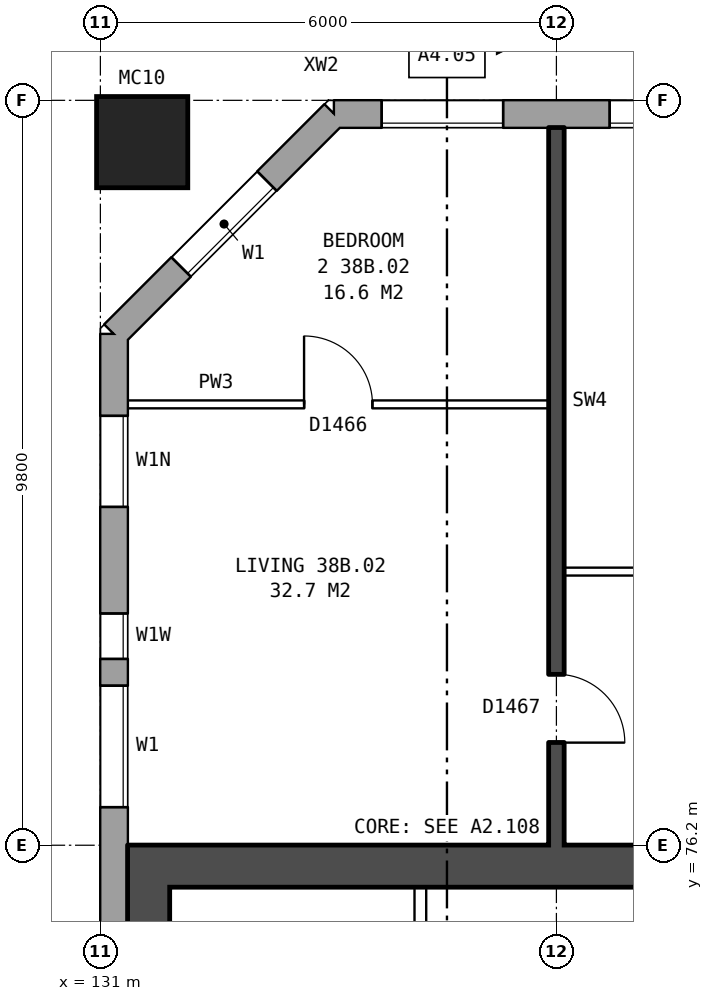
"""IFC4 building model, lengths in metres.
Left out: names, types, materials, properties, quantities, classifications, styles, units other than length and angle.
Written with IfcOpenShell. Run it as: python <this file> out.ifc"""

import sys

from ifc_helpers import new_model, si_unit, direction, frame, frame_2d, origin, origin_2d, place, context, subcontext, project, spatial, rectangle, hollow_rectangle, extrude, element, fill, save


model = new_model("IFC4")
c1 = context("Model", 3, precision=1e-05, world=origin(), true_north=direction((0.0, 1.0)))
c2 = subcontext(c1, "Body", "Model", "MODEL_VIEW")
j1 = project(units=[si_unit("LENGTHUNIT", "METRE"), si_unit("PLANEANGLEUNIT", "RADIAN")], contexts=[c1])
p1 = place(None, origin())
s1 = spatial("IfcSite", under=j1, at=p1, CompositionType="ELEMENT")
p2 = place(p1, origin())
s2 = spatial("IfcBuilding", under=s1, at=p2, CompositionType="ELEMENT")
p3 = place(p2, frame((0.0, 0.0, 136.1)))
s3 = spatial("IfcBuildingStorey", under=s2, at=p3, CompositionType="ELEMENT", Elevation=136.1)
p4 = place(p3, frame((131.55, 85.45, 0.0), z_axis=(0.0, 0.0, 1.0), x_axis=(1.0, 0.0, 0.0)))
e1 = element("IfcColumn", 1, at=p4, inside=s3, PredefinedType="COLUMN", context=c2, shape_type="SweptSolid", body=[
    extrude(hollow_rectangle(XDim=1.2, YDim=1.2, WallThickness=0.065, at=origin_2d()), origin(), (0.0, 0.0, 1.0), 3.1),
])
p5 = place(p3, frame((169.675, 85.82, 0.0), z_axis=(0.0, 0.0, 1.0), x_axis=(-1.0, 0.0, 0.0)))
e2 = element("IfcWall", 2, at=p5, inside=s3, PredefinedType="STANDARD", context=c2, shape_type="SweptSolid", body=[
    extrude(rectangle(XDim=35.601, YDim=0.36, at=frame_2d((17.8, 0.0))), origin(), (0.0, 0.0, 1.0), 2.85),
])
p6 = place(p5, frame((0.375, 0.0, 0.8)))
e3 = element("IfcOpeningElement", 3, at=p6, cuts=e2, PredefinedType="OPENING", context=c2, shape_type="SweptSolid", body=[
    extrude(rectangle(XDim=1.6, YDim=1.8, at=frame_2d((0.8, 0.9))), frame((0.0, 0.19, 0.0), z_axis=(0.0, -1.0, 0.0), x_axis=(1.0, 0.0, 0.0)), (0.0, 0.0, 1.0), 0.38),
])
p7 = place(p5, frame((3.375, 0.0, 0.8)))
e4 = element("IfcOpeningElement", 4, at=p7, cuts=e2, PredefinedType="OPENING", context=c2, shape_type="SweptSolid", body=[
    extrude(rectangle(XDim=1.6, YDim=1.8, at=frame_2d((0.8, 0.9))), frame((0.0, 0.19, 0.0), z_axis=(0.0, -1.0, 0.0), x_axis=(1.0, 0.0, 0.0)), (0.0, 0.0, 1.0), 0.38),
])
p8 = place(p5, frame((6.375, 0.0, 0.8)))
e5 = element("IfcOpeningElement", 5, at=p8, cuts=e2, PredefinedType="OPENING", context=c2, shape_type="SweptSolid", body=[
    extrude(rectangle(XDim=1.6, YDim=1.8, at=frame_2d((0.8, 0.9))), frame((0.0, 0.19, 0.0), z_axis=(0.0, -1.0, 0.0), x_axis=(1.0, 0.0, 0.0)), (0.0, 0.0, 1.0), 0.38),
])
p9 = place(p5, frame((9.375, 0.0, 0.8)))
e6 = element("IfcOpeningElement", 6, at=p9, cuts=e2, PredefinedType="OPENING", context=c2, shape_type="SweptSolid", body=[
    extrude(rectangle(XDim=1.6, YDim=1.8, at=frame_2d((0.8, 0.9))), frame((0.0, 0.19, 0.0), z_axis=(0.0, -1.0, 0.0), x_axis=(1.0, 0.0, 0.0)), (0.0, 0.0, 1.0), 0.38),
])
p10 = place(p5, frame((11.275, 0.0, 0.8)))
e7 = element("IfcOpeningElement", 7, at=p10, cuts=e2, PredefinedType="OPENING", context=c2, shape_type="SweptSolid", body=[
    extrude(rectangle(XDim=1.2, YDim=1.8, at=frame_2d((0.6, 0.9))), frame((0.0, 0.19, 0.0), z_axis=(0.0, -1.0, 0.0), x_axis=(1.0, 0.0, 0.0)), (0.0, 0.0, 1.0), 0.38),
])
p11 = place(p5, frame((15.375, 0.0, 0.8)))
e8 = element("IfcOpeningElement", 8, at=p11, cuts=e2, PredefinedType="OPENING", context=c2, shape_type="SweptSolid", body=[
    extrude(rectangle(XDim=1.6, YDim=1.8, at=frame_2d((0.8, 0.9))), frame((0.0, 0.19, 0.0), z_axis=(0.0, -1.0, 0.0), x_axis=(1.0, 0.0, 0.0)), (0.0, 0.0, 1.0), 0.38),
])
p12 = place(p5, frame((18.375, 0.0, 0.8)))
e9 = element("IfcOpeningElement", 9, at=p12, cuts=e2, PredefinedType="OPENING", context=c2, shape_type="SweptSolid", body=[
    extrude(rectangle(XDim=1.6, YDim=1.8, at=frame_2d((0.8, 0.9))), frame((0.0, 0.19, 0.0), z_axis=(0.0, -1.0, 0.0), x_axis=(1.0, 0.0, 0.0)), (0.0, 0.0, 1.0), 0.38),
])
p13 = place(p5, frame((20.875, 0.0, 0.35)))
e10 = element("IfcOpeningElement", 10, at=p13, cuts=e2, PredefinedType="OPENING", context=c2, shape_type="SweptSolid", body=[
    extrude(rectangle(XDim=0.6, YDim=0.9, at=frame_2d((0.3, 0.45))), frame((0.0, 0.19, 0.0), z_axis=(0.0, -1.0, 0.0), x_axis=(1.0, 0.0, 0.0)), (0.0, 0.0, 1.0), 0.38),
])
p14 = place(p5, frame((24.375, 0.0, 0.8)))
e11 = element("IfcOpeningElement", 11, at=p14, cuts=e2, PredefinedType="OPENING", context=c2, shape_type="SweptSolid", body=[
    extrude(rectangle(XDim=1.6, YDim=1.8, at=frame_2d((0.8, 0.9))), frame((0.0, 0.19, 0.0), z_axis=(0.0, -1.0, 0.0), x_axis=(1.0, 0.0, 0.0)), (0.0, 0.0, 1.0), 0.38),
])
p15 = place(p5, frame((27.375, 0.0, 0.8)))
e12 = element("IfcOpeningElement", 12, at=p15, cuts=e2, PredefinedType="OPENING", context=c2, shape_type="SweptSolid", body=[
    extrude(rectangle(XDim=1.6, YDim=1.8, at=frame_2d((0.8, 0.9))), frame((0.0, 0.19, 0.0), z_axis=(0.0, -1.0, 0.0), x_axis=(1.0, 0.0, 0.0)), (0.0, 0.0, 1.0), 0.38),
])
p16 = place(p5, frame((30.375, 0.0, 0.8)))
e13 = element("IfcOpeningElement", 13, at=p16, cuts=e2, PredefinedType="OPENING", context=c2, shape_type="SweptSolid", body=[
    extrude(rectangle(XDim=1.6, YDim=1.8, at=frame_2d((0.8, 0.9))), frame((0.0, 0.19, 0.0), z_axis=(0.0, -1.0, 0.0), x_axis=(1.0, 0.0, 0.0)), (0.0, 0.0, 1.0), 0.38),
])
p17 = place(p5, frame((33.375, 0.0, 0.8)))
e14 = element("IfcOpeningElement", 14, at=p17, cuts=e2, PredefinedType="OPENING", context=c2, shape_type="SweptSolid", body=[
    extrude(rectangle(XDim=1.6, YDim=1.8, at=frame_2d((0.8, 0.9))), frame((0.0, 0.19, 0.0), z_axis=(0.0, -1.0, 0.0), x_axis=(1.0, 0.0, 0.0)), (0.0, 0.0, 1.0), 0.38),
])
p18 = place(p5, frame((12.775, 0.0, 1.6)))
e15 = element("IfcOpeningElement", 15, at=p18, cuts=e2, PredefinedType="OPENING", context=c2, shape_type="SweptSolid", body=[
    extrude(rectangle(XDim=0.6, YDim=0.9, at=frame_2d((0.3, 0.45))), frame((0.0, 0.19, 0.0), z_axis=(0.0, -1.0, 0.0), x_axis=(1.0, 0.0, 0.0)), (0.0, 0.0, 1.0), 0.38),
])
p19 = place(p5, frame((22.425, 0.0, 1.35)))
e16 = element("IfcOpeningElement", 16, at=p19, cuts=e2, PredefinedType="OPENING", context=c2, shape_type="SweptSolid", body=[
    extrude(rectangle(XDim=1.0, YDim=1.2, at=frame_2d((0.5, 0.6))), frame((0.0, 0.19, 0.0), z_axis=(0.0, -1.0, 0.0), x_axis=(1.0, 0.0, 0.0)), (0.0, 0.0, 1.0), 0.38),
])
p20 = place(p3, frame((134.075, 85.82, 0.0), z_axis=(0.0, 0.0, 1.0), x_axis=(-0.707106781187, -0.707106781187, 0.0)))
e17 = element("IfcWall", 17, at=p20, inside=s3, PredefinedType="STANDARD", context=c2, shape_type="SweptSolid", body=[
    extrude(rectangle(XDim=4.094, YDim=0.36, at=frame_2d((2.047, 0.0))), origin(), (0.0, 0.0, 1.0), 2.85),
])
p21 = place(p20, frame((1.247, 0.0, 0.8)))
e18 = element("IfcOpeningElement", 18, at=p21, cuts=e17, PredefinedType="OPENING", context=c2, shape_type="SweptSolid", body=[
    extrude(rectangle(XDim=1.6, YDim=1.8, at=frame_2d((0.8, 0.9))), frame((0.0, 0.19, 0.0), z_axis=(0.0, -1.0, 0.0), x_axis=(1.0, 0.0, 0.0)), (0.0, 0.0, 1.0), 0.38),
])
p22 = place(p3, frame((131.18, 82.925, 0.0), z_axis=(0.0, 0.0, 1.0), x_axis=(0.0, -1.0, 0.0)))
e19 = element("IfcWall", 19, at=p22, inside=s3, PredefinedType="STANDARD", context=c2, shape_type="SweptSolid", body=[
    extrude(rectangle(XDim=25.851, YDim=0.36, at=frame_2d((12.925, 0.0))), origin(), (0.0, 0.0, 1.0), 2.85),
])
p23 = place(p22, frame((1.075, 0.0, 0.8)))
e20 = element("IfcOpeningElement", 20, at=p23, cuts=e19, PredefinedType="OPENING", context=c2, shape_type="SweptSolid", body=[
    extrude(rectangle(XDim=1.2, YDim=1.2, at=frame_2d((0.6, 0.6))), frame((0.0, 0.19, 0.0), z_axis=(0.0, -1.0, 0.0), x_axis=(1.0, 0.0, 0.0)), (0.0, 0.0, 1.0), 0.38),
])
p24 = place(p22, frame((4.625, 0.0, 0.8)))
e21 = element("IfcOpeningElement", 21, at=p24, cuts=e19, PredefinedType="OPENING", context=c2, shape_type="SweptSolid", body=[
    extrude(rectangle(XDim=1.6, YDim=1.8, at=frame_2d((0.8, 0.9))), frame((0.0, 0.19, 0.0), z_axis=(0.0, -1.0, 0.0), x_axis=(1.0, 0.0, 0.0)), (0.0, 0.0, 1.0), 0.38),
])
p25 = place(p22, frame((19.625, 0.0, 0.8)))
e22 = element("IfcOpeningElement", 22, at=p25, cuts=e19, PredefinedType="OPENING", context=c2, shape_type="SweptSolid", body=[
    extrude(rectangle(XDim=1.6, YDim=1.8, at=frame_2d((0.8, 0.9))), frame((0.0, 0.19, 0.0), z_axis=(0.0, -1.0, 0.0), x_axis=(1.0, 0.0, 0.0)), (0.0, 0.0, 1.0), 0.38),
])
p26 = place(p22, frame((21.55, 0.0, 1.7)))
e23 = element("IfcOpeningElement", 23, at=p26, cuts=e19, PredefinedType="OPENING", context=c2, shape_type="SweptSolid", body=[
    extrude(rectangle(XDim=0.6, YDim=0.9, at=frame_2d((0.3, 0.45))), frame((0.0, 0.19, 0.0), z_axis=(0.0, -1.0, 0.0), x_axis=(1.0, 0.0, 0.0)), (0.0, 0.0, 1.0), 0.38),
])
p27 = place(p22, frame((3.675, 0.0, 1.7)))
e24 = element("IfcOpeningElement", 24, at=p27, cuts=e19, PredefinedType="OPENING", context=c2, shape_type="SweptSolid", body=[
    extrude(rectangle(XDim=0.6, YDim=0.9, at=frame_2d((0.3, 0.45))), frame((0.0, 0.19, 0.0), z_axis=(0.0, -1.0, 0.0), x_axis=(1.0, 0.0, 0.0)), (0.0, 0.0, 1.0), 0.38),
])
p28 = place(p22, frame((23.1, 0.0, 0.8)))
e25 = element("IfcOpeningElement", 25, at=p28, cuts=e19, PredefinedType="OPENING", context=c2, shape_type="SweptSolid", body=[
    extrude(rectangle(XDim=1.6, YDim=0.9, at=frame_2d((0.8, 0.45))), frame((0.0, 0.19, 0.0), z_axis=(0.0, -1.0, 0.0), x_axis=(1.0, 0.0, 0.0)), (0.0, 0.0, 1.0), 0.38),
])
p29 = place(p3, frame((131.635, 63.8, 0.0), z_axis=(0.0, 0.0, 1.0), x_axis=(0.0, 1.0, 0.0)))
e26 = element("IfcWall", 26, at=p29, inside=s3, PredefinedType="SHEAR", context=c2, shape_type="SweptSolid", body=[
    extrude(rectangle(XDim=12.4, YDim=0.55, at=frame_2d((6.2, 0.0))), origin(), (0.0, 0.0, 1.0), 2.85),
])
p30 = place(p3, frame((139.21, 75.925, 0.0), z_axis=(0.0, 0.0, 1.0), x_axis=(-1.0, 0.0, 0.0)))
e27 = element("IfcWall", 27, at=p30, inside=s3, PredefinedType="SHEAR", context=c2, shape_type="SweptSolid", body=[
    extrude(rectangle(XDim=7.3, YDim=0.55, at=frame_2d((3.65, 0.0))), origin(), (0.0, 0.0, 1.0), 2.85),
])
p31 = place(p3, frame((135.21, 71.375, 0.0), z_axis=(0.0, 0.0, 1.0), x_axis=(0.0, 1.0, 0.0)))
e28 = element("IfcWall", 28, at=p31, inside=s3, PredefinedType="PARTITIONING", context=c2, shape_type="SweptSolid", body=[
    extrude(rectangle(XDim=4.275, YDim=0.15, at=frame_2d((2.137, 0.0))), origin(), (0.0, 0.0, 1.0), 2.85),
])
p32 = place(p31, frame((2.625, 0.0, 0.0)))
e29 = element("IfcOpeningElement", 29, at=p32, cuts=e28, PredefinedType="OPENING", context=c2, shape_type="SweptSolid", body=[
    extrude(rectangle(XDim=1.1, YDim=2.1, at=frame_2d((0.55, 1.05))), frame((0.0, 0.085, 0.0), z_axis=(0.0, -1.0, 0.0), x_axis=(1.0, 0.0, 0.0)), (0.0, 0.0, 1.0), 0.17),
])
p33 = place(p3, frame((137.1, 79.8, 0.0), z_axis=(0.0, 0.0, 1.0), x_axis=(1.0, 0.0, 0.0)))
e30 = element("IfcWall", 30, at=p33, inside=s3, PredefinedType="PARTITIONING", context=c2, shape_type="SweptSolid", body=[
    extrude(rectangle(XDim=5.8, YDim=0.1, at=frame_2d((2.9, 0.0))), origin(), (0.0, 0.0, 1.0), 2.85),
])
p34 = place(p33, frame((1.3, 0.0, 0.0)))
e31 = element("IfcOpeningElement", 31, at=p34, cuts=e30, PredefinedType="OPENING", context=c2, shape_type="SweptSolid", body=[
    extrude(rectangle(XDim=0.9, YDim=2.1, at=frame_2d((0.45, 1.05))), frame((0.0, 0.06, 0.0), z_axis=(0.0, -1.0, 0.0), x_axis=(1.0, 0.0, 0.0)), (0.0, 0.0, 1.0), 0.12),
])
p35 = place(p33, frame((4.2, 0.0, 0.0)))
e32 = element("IfcOpeningElement", 32, at=p35, cuts=e30, PredefinedType="OPENING", context=c2, shape_type="SweptSolid", body=[
    extrude(rectangle(XDim=0.9, YDim=2.1, at=frame_2d((0.45, 1.05))), frame((0.0, 0.06, 0.0), z_axis=(0.0, -1.0, 0.0), x_axis=(1.0, 0.0, 0.0)), (0.0, 0.0, 1.0), 0.12),
])
p36 = place(p3, frame((131.36, 82.0, 0.0), z_axis=(0.0, 0.0, 1.0), x_axis=(1.0, 0.0, 0.0)))
e33 = element("IfcWall", 33, at=p36, inside=s3, PredefinedType="PARTITIONING", context=c2, shape_type="SweptSolid", body=[
    extrude(rectangle(XDim=5.54, YDim=0.1, at=frame_2d((2.77, 0.0))), origin(), (0.0, 0.0, 1.0), 2.85),
])
p37 = place(p36, frame((2.32, 0.0, 0.0)))
e34 = element("IfcOpeningElement", 34, at=p37, cuts=e33, PredefinedType="OPENING", context=c2, shape_type="SweptSolid", body=[
    extrude(rectangle(XDim=0.9, YDim=2.1, at=frame_2d((0.45, 1.05))), frame((0.0, 0.06, 0.0), z_axis=(0.0, -1.0, 0.0), x_axis=(1.0, 0.0, 0.0)), (0.0, 0.0, 1.0), 0.12),
])
p38 = place(p3, frame((137.0, 76.2, 0.0), z_axis=(0.0, 0.0, 1.0), x_axis=(0.0, 1.0, 0.0)))
e35 = element("IfcWall", 35, at=p38, inside=s3, PredefinedType="SOLIDWALL", context=c2, shape_type="SweptSolid", body=[
    extrude(rectangle(XDim=9.44, YDim=0.2, at=frame_2d((4.72, 0.0))), origin(), (0.0, 0.0, 1.0), 2.85),
])
p39 = place(p38, frame((1.35, 0.0, 0.0)))
e36 = element("IfcOpeningElement", 36, at=p39, cuts=e35, PredefinedType="OPENING", context=c2, shape_type="SweptSolid", body=[
    extrude(rectangle(XDim=0.9, YDim=2.1, at=frame_2d((0.45, 1.05))), frame((0.0, 0.11, 0.0), z_axis=(0.0, -1.0, 0.0), x_axis=(1.0, 0.0, 0.0)), (0.0, 0.0, 1.0), 0.22),
])
p40 = place(p16, origin())
e37 = element("IfcWindow", 37, at=p40, inside=s3, PartitioningType="SINGLE_PANEL", PredefinedType="WINDOW", context=c2, shape_type="SweptSolid", body=[
    extrude(rectangle(XDim=1.6, YDim=1.8, at=frame_2d((0.8, 0.9))), frame((0.0, 0.15, 0.0), z_axis=(0.0, -1.0, 0.0), x_axis=(1.0, 0.0, 0.0)), (0.0, 0.0, 1.0), 0.06),
])
fill(e13, e37)
p41 = place(p17, origin())
e38 = element("IfcWindow", 38, at=p41, inside=s3, PartitioningType="SINGLE_PANEL", PredefinedType="WINDOW", context=c2, shape_type="SweptSolid", body=[
    extrude(rectangle(XDim=1.6, YDim=1.8, at=frame_2d((0.8, 0.9))), frame((0.0, 0.15, 0.0), z_axis=(0.0, -1.0, 0.0), x_axis=(1.0, 0.0, 0.0)), (0.0, 0.0, 1.0), 0.06),
])
fill(e14, e38)
p42 = place(p21, origin())
e39 = element("IfcWindow", 39, at=p42, inside=s3, PartitioningType="SINGLE_PANEL", PredefinedType="WINDOW", context=c2, shape_type="SweptSolid", body=[
    extrude(rectangle(XDim=1.6, YDim=1.8, at=frame_2d((0.8, 0.9))), frame((0.0, 0.15, 0.0), z_axis=(0.0, -1.0, 0.0), x_axis=(1.0, 0.0, 0.0)), (0.0, 0.0, 1.0), 0.06),
])
fill(e18, e39)
p43 = place(p23, origin())
e40 = element("IfcWindow", 40, at=p43, inside=s3, PartitioningType="SINGLE_PANEL", PredefinedType="WINDOW", context=c2, shape_type="SweptSolid", body=[
    extrude(rectangle(XDim=1.2, YDim=1.2, at=frame_2d((0.6, 0.6))), frame((0.0, 0.15, 0.0), z_axis=(0.0, -1.0, 0.0), x_axis=(1.0, 0.0, 0.0)), (0.0, 0.0, 1.0), 0.06),
])
fill(e20, e40)
p44 = place(p24, origin())
e41 = element("IfcWindow", 41, at=p44, inside=s3, PartitioningType="SINGLE_PANEL", PredefinedType="WINDOW", context=c2, shape_type="SweptSolid", body=[
    extrude(rectangle(XDim=1.6, YDim=1.8, at=frame_2d((0.8, 0.9))), frame((0.0, 0.15, 0.0), z_axis=(0.0, -1.0, 0.0), x_axis=(1.0, 0.0, 0.0)), (0.0, 0.0, 1.0), 0.06),
])
fill(e21, e41)
p45 = place(p37, origin())
e42 = element("IfcDoor", 42, at=p45, inside=s3, OperationType="SINGLE_SWING_LEFT", PredefinedType="DOOR", context=c2, shape_type="SweptSolid", body=[
    extrude(rectangle(XDim=0.9, YDim=2.1, at=frame_2d((0.45, 1.05))), frame((0.0, 0.025, 0.0), z_axis=(0.0, -1.0, 0.0), x_axis=(1.0, 0.0, 0.0)), (0.0, 0.0, 1.0), 0.05),
])
fill(e34, e42)
p46 = place(p39, frame((0.9, 0.0, 0.0), z_axis=(0.0, 0.0, 1.0), x_axis=(-1.0, 0.0, 0.0)))
e43 = element("IfcDoor", 43, at=p46, inside=s3, OperationType="SINGLE_SWING_RIGHT", PredefinedType="DOOR", context=c2, shape_type="SweptSolid", body=[
    extrude(rectangle(XDim=0.9, YDim=2.1, at=frame_2d((0.45, 1.05))), frame((0.0, 0.025, 0.0), z_axis=(0.0, -1.0, 0.0), x_axis=(1.0, 0.0, 0.0)), (0.0, 0.0, 1.0), 0.05),
])
fill(e36, e43)
p47 = place(p27, origin())
e44 = element("IfcWindow", 44, at=p47, inside=s3, PartitioningType="SINGLE_PANEL", PredefinedType="WINDOW", context=c2, shape_type="SweptSolid", body=[
    extrude(rectangle(XDim=0.6, YDim=0.9, at=frame_2d((0.3, 0.45))), frame((0.0, 0.15, 0.0), z_axis=(0.0, -1.0, 0.0), x_axis=(1.0, 0.0, 0.0)), (0.0, 0.0, 1.0), 0.06),
])
fill(e24, e44)
save(model, sys.argv[1])
